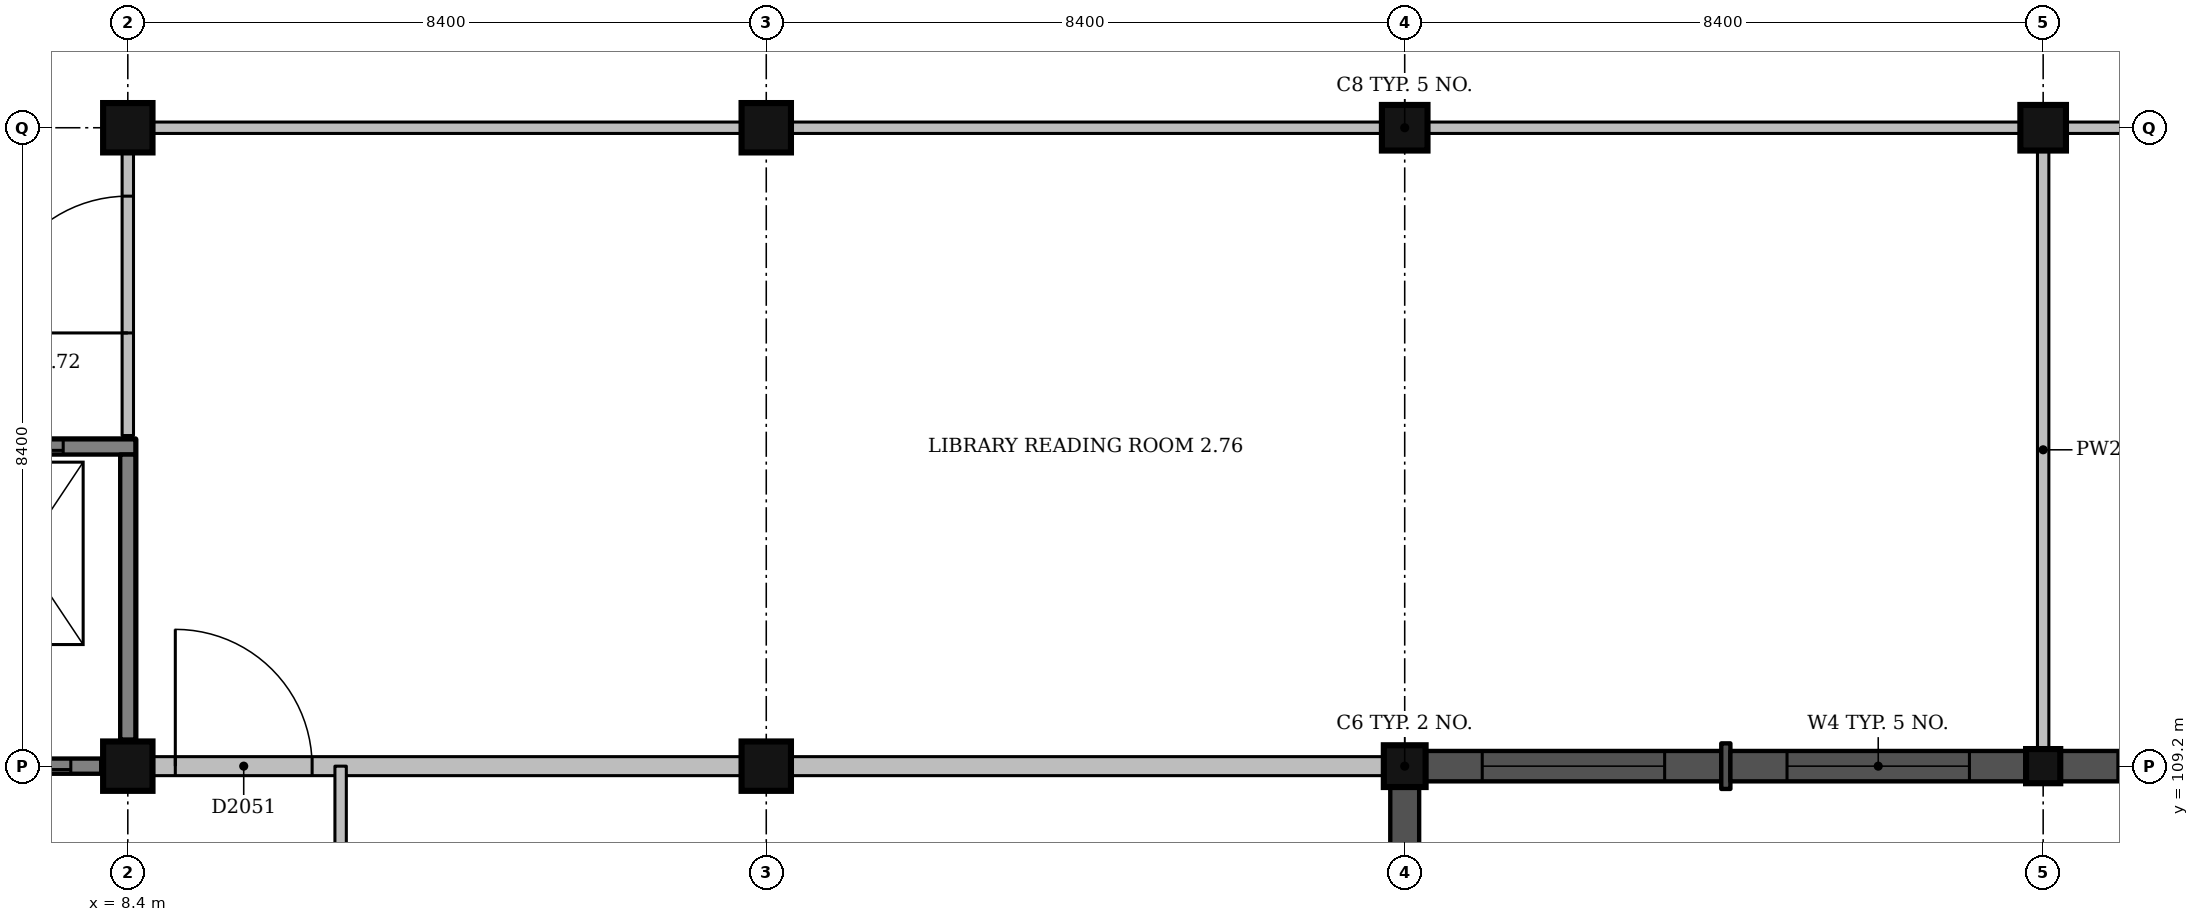
"""IFC4 building model, lengths in metres.
Left out: names, types, materials, properties, quantities, classifications, styles, units other than length and angle.
Written with IfcOpenShell. Run it as: python <this file> out.ifc"""

import sys

from ifc_helpers import new_model, si_unit, direction, frame, frame_2d, origin, origin_2d, place, context, subcontext, project, spatial, rectangle, extrude, element, fill, save


model = new_model("IFC4")
c1 = context("Model", 3, precision=1e-05, world=origin(), true_north=direction((0.0, 1.0)))
c2 = subcontext(c1, "Body", "Model", "MODEL_VIEW")
j1 = project(units=[si_unit("LENGTHUNIT", "METRE"), si_unit("PLANEANGLEUNIT", "RADIAN")], contexts=[c1])
p1 = place(None, origin())
s1 = spatial("IfcSite", under=j1, at=p1, CompositionType="ELEMENT")
p2 = place(p1, origin())
s2 = spatial("IfcBuilding", under=s1, at=p2, CompositionType="ELEMENT")
p3 = place(p2, frame((0.0, 0.0, 9.0)))
s3 = spatial("IfcBuildingStorey", under=s2, at=p3, CompositionType="ELEMENT", Elevation=9.0)
for number, where, z_axis, x_axis in (
    (1, (8.4, 109.2, 0.0), (0.0, 0.0, 1.0), (1.0, 0.0, 0.0)),
    (2, (16.8, 109.2, 0.0), (0.0, 0.0, 1.0), (1.0, 0.0, 0.0)),
):
    element("IfcColumn", number, at=place(p3, frame(where, z_axis=z_axis, x_axis=x_axis)), inside=s3, PredefinedType="COLUMN", context=c2, shape_type="SweptSolid", body=[
        extrude(rectangle(XDim=0.65, YDim=0.65, at=origin_2d()), origin(), (0.0, 0.0, 1.0), 4.5),
    ])
p4 = place(p3, frame((25.2, 109.2, 0.0), z_axis=(0.0, 0.0, 1.0), x_axis=(1.0, 0.0, 0.0)))
e3 = element("IfcColumn", 3, at=p4, inside=s3, PredefinedType="COLUMN", context=c2, shape_type="SweptSolid", body=[
    extrude(rectangle(XDim=0.55, YDim=0.55, at=origin_2d()), origin(), (0.0, 0.0, 1.0), 4.5),
])
for number, where, z_axis, x_axis in (
    (4, (8.4, 117.6, -1.5), (0.0, 0.0, 1.0), (1.0, 0.0, 0.0)),
    (5, (16.8, 117.6, -1.5), (0.0, 0.0, 1.0), (1.0, 0.0, 0.0)),
):
    element("IfcColumn", number, at=place(p3, frame(where, z_axis=z_axis, x_axis=x_axis)), inside=s3, PredefinedType="COLUMN", context=c2, shape_type="SweptSolid", body=[
        extrude(rectangle(XDim=0.65, YDim=0.65, at=origin_2d()), origin(), (0.0, 0.0, 1.0), 6.0),
    ])
p5 = place(p3, frame((25.2, 117.6, -1.5), z_axis=(0.0, 0.0, 1.0), x_axis=(1.0, 0.0, 0.0)))
e6 = element("IfcColumn", 6, at=p5, inside=s3, PredefinedType="COLUMN", context=c2, shape_type="SweptSolid", body=[
    extrude(rectangle(XDim=0.6, YDim=0.6, at=origin_2d()), origin(), (0.0, 0.0, 1.0), 6.0),
])
p6 = place(p3, frame((33.6, 109.2, -0.25), z_axis=(0.0, 0.0, 1.0), x_axis=(1.0, 0.0, 0.0)))
e7 = element("IfcColumn", 7, at=p6, inside=s3, PredefinedType="COLUMN", context=c2, shape_type="SweptSolid", body=[
    extrude(rectangle(XDim=0.45, YDim=0.45, at=origin_2d()), origin(), (0.0, 0.0, 1.0), 4.75),
])
p7 = place(p3, frame((33.6, 117.6, -1.5), z_axis=(0.0, 0.0, 1.0), x_axis=(1.0, 0.0, 0.0)))
e8 = element("IfcColumn", 8, at=p7, inside=s3, PredefinedType="COLUMN", context=c2, shape_type="SweptSolid", body=[
    extrude(rectangle(XDim=0.6, YDim=0.6, at=origin_2d()), origin(), (0.0, 0.0, 1.0), 6.0),
])
p8 = place(p3, frame((5.5, 109.2, 0.0), z_axis=(0.0, 0.0, 1.0), x_axis=(1.0, 0.0, 0.0)))
e9 = element("IfcWall", 9, at=p8, inside=s3, PredefinedType="SHEAR", context=c2, shape_type="SweptSolid", body=[
    extrude(rectangle(XDim=2.55, YDim=0.2, at=frame_2d((1.275, 0.0))), origin(), (0.0, 0.0, 1.0), 4.5),
])
p9 = place(p8, frame((1.05, 0.0, 0.0)))
e10 = element("IfcOpeningElement", 10, at=p9, cuts=e9, PredefinedType="OPENING", context=c2, shape_type="SweptSolid", body=[
    extrude(rectangle(XDim=1.1, YDim=2.1, at=frame_2d((0.55, 1.05))), frame((0.0, 0.11, 0.0), z_axis=(0.0, -1.0, 0.0), x_axis=(1.0, 0.0, 0.0)), (0.0, 0.0, 1.0), 0.22),
])
p10 = place(p3, frame((5.5, 113.4, 0.0), z_axis=(0.0, 0.0, 1.0), x_axis=(1.0, 0.0, 0.0)))
e11 = element("IfcWall", 11, at=p10, inside=s3, PredefinedType="SHEAR", context=c2, shape_type="SweptSolid", body=[
    extrude(rectangle(XDim=3.0, YDim=0.2, at=frame_2d((1.5, 0.0))), origin(), (0.0, 0.0, 1.0), 4.5),
])
p11 = place(p10, frame((0.95, 0.0, 0.0)))
e12 = element("IfcOpeningElement", 12, at=p11, cuts=e11, PredefinedType="OPENING", context=c2, shape_type="SweptSolid", body=[
    extrude(rectangle(XDim=1.1, YDim=2.1, at=frame_2d((0.55, 1.05))), frame((0.0, 0.11, 0.0), z_axis=(0.0, -1.0, 0.0), x_axis=(1.0, 0.0, 0.0)), (0.0, 0.0, 1.0), 0.22),
])
p12 = place(p3, frame((8.4, 109.55, 0.0), z_axis=(0.0, 0.0, 1.0), x_axis=(0.0, 1.0, 0.0)))
e13 = element("IfcWall", 13, at=p12, inside=s3, PredefinedType="SHEAR", context=c2, shape_type="SweptSolid", body=[
    extrude(rectangle(XDim=3.75, YDim=0.2, at=frame_2d((1.875, 0.0))), origin(), (0.0, 0.0, 1.0), 4.5),
])
p13 = place(p3, frame((25.2, 105.275, 0.0), z_axis=(0.0, 0.0, 1.0), x_axis=(0.0, 1.0, 0.0)))
e14 = element("IfcWall", 14, at=p13, inside=s3, PredefinedType="SOLIDWALL", context=c2, shape_type="SweptSolid", body=[
    extrude(rectangle(XDim=3.65, YDim=0.38, at=frame_2d((1.825, 0.0))), origin(), (0.0, 0.0, 1.0), 3.35),
])
p14 = place(p13, frame((1.225, 0.0, 2.4)))
e15 = element("IfcOpeningElement", 15, at=p14, cuts=e14, PredefinedType="OPENING", context=c2, shape_type="SweptSolid", body=[
    extrude(rectangle(XDim=1.2, YDim=0.6, at=frame_2d((0.6, 0.3))), frame((0.0, 0.2, 0.0), z_axis=(0.0, -1.0, 0.0), x_axis=(1.0, 0.0, 0.0)), (0.0, 0.0, 1.0), 0.4),
])
p15 = place(p3, frame((25.475, 109.2, 0.0), z_axis=(0.0, 0.0, 1.0), x_axis=(1.0, 0.0, 0.0)))
e16 = element("IfcWall", 16, at=p15, inside=s3, PredefinedType="SOLIDWALL", context=c2, shape_type="SweptSolid", body=[
    extrude(rectangle(XDim=3.89, YDim=0.4, at=frame_2d((1.945, 0.0))), origin(), (0.0, 0.0, 1.0), 4.2),
])
p16 = place(p15, frame((0.745, 0.0, 0.6)))
e17 = element("IfcOpeningElement", 17, at=p16, cuts=e16, PredefinedType="OPENING", context=c2, shape_type="SweptSolid", body=[
    extrude(rectangle(XDim=2.4, YDim=2.4, at=frame_2d((1.2, 1.2))), frame((0.0, 0.21, 0.0), z_axis=(0.0, -1.0, 0.0), x_axis=(1.0, 0.0, 0.0)), (0.0, 0.0, 1.0), 0.42),
])
p17 = place(p3, frame((29.365, 109.2, 0.0), z_axis=(0.0, 0.0, 1.0), x_axis=(1.0, 0.0, 0.0)))
e18 = element("IfcWall", 18, at=p17, inside=s3, PredefinedType="SOLIDWALL", context=c2, shape_type="SweptSolid", body=[
    extrude(rectangle(XDim=0.12, YDim=0.6, at=frame_2d((0.06, 0.0))), origin(), (0.0, 0.0, 1.0), 4.2),
])
p18 = place(p3, frame((29.485, 109.2, 0.0), z_axis=(0.0, 0.0, 1.0), x_axis=(1.0, 0.0, 0.0)))
e19 = element("IfcWall", 19, at=p18, inside=s3, PredefinedType="SOLIDWALL", context=c2, shape_type="SweptSolid", body=[
    extrude(rectangle(XDim=3.89, YDim=0.4, at=frame_2d((1.945, 0.0))), origin(), (0.0, 0.0, 1.0), 4.2),
])
p19 = place(p18, frame((0.745, 0.0, 0.6)))
e20 = element("IfcOpeningElement", 20, at=p19, cuts=e19, PredefinedType="OPENING", context=c2, shape_type="SweptSolid", body=[
    extrude(rectangle(XDim=2.4, YDim=2.4, at=frame_2d((1.2, 1.2))), frame((0.0, 0.21, 0.0), z_axis=(0.0, -1.0, 0.0), x_axis=(1.0, 0.0, 0.0)), (0.0, 0.0, 1.0), 0.42),
])
p20 = place(p3, frame((33.825, 109.2, 0.0), z_axis=(0.0, 0.0, 1.0), x_axis=(1.0, 0.0, 0.0)))
e21 = element("IfcWall", 21, at=p20, inside=s3, PredefinedType="SOLIDWALL", context=c2, shape_type="SweptSolid", body=[
    extrude(rectangle(XDim=3.915, YDim=0.4, at=frame_2d((1.958, 0.0))), origin(), (0.0, 0.0, 1.0), 3.35),
])
p21 = place(p20, frame((0.758, 0.0, 0.6)))
e22 = element("IfcOpeningElement", 22, at=p21, cuts=e21, PredefinedType="OPENING", context=c2, shape_type="SweptSolid", body=[
    extrude(rectangle(XDim=2.4, YDim=2.4, at=frame_2d((1.2, 1.2))), frame((0.0, 0.21, 0.0), z_axis=(0.0, -1.0, 0.0), x_axis=(1.0, 0.0, 0.0)), (0.0, 0.0, 1.0), 0.42),
])
p22 = place(p3, frame((8.725, 109.2, 0.0), z_axis=(0.0, 0.0, 1.0), x_axis=(1.0, 0.0, 0.0)))
e23 = element("IfcWall", 23, at=p22, inside=s3, PredefinedType="SOLIDWALL", context=c2, shape_type="SweptSolid", body=[
    extrude(rectangle(XDim=7.75, YDim=0.25, at=frame_2d((3.875, 0.0))), origin(), (0.0, 0.0, 1.0), 4.15),
])
p23 = place(p22, frame((0.3, 0.0, 0.0)))
e24 = element("IfcOpeningElement", 24, at=p23, cuts=e23, PredefinedType="OPENING", context=c2, shape_type="SweptSolid", body=[
    extrude(rectangle(XDim=1.8, YDim=2.1, at=frame_2d((0.9, 1.05))), frame((0.0, 0.135, 0.0), z_axis=(0.0, -1.0, 0.0), x_axis=(1.0, 0.0, 0.0)), (0.0, 0.0, 1.0), 0.27),
])
p24 = place(p3, frame((17.125, 109.2, 0.0), z_axis=(0.0, 0.0, 1.0), x_axis=(1.0, 0.0, 0.0)))
e25 = element("IfcWall", 25, at=p24, inside=s3, PredefinedType="SOLIDWALL", context=c2, shape_type="SweptSolid", body=[
    extrude(rectangle(XDim=7.8, YDim=0.25, at=frame_2d((3.9, 0.0))), origin(), (0.0, 0.0, 1.0), 3.35),
])
p25 = place(p3, frame((8.725, 117.6, 0.0), z_axis=(0.0, 0.0, 1.0), x_axis=(1.0, 0.0, 0.0)))
e26 = element("IfcWall", 26, at=p25, inside=s3, PredefinedType="PARTITIONING", context=c2, shape_type="SweptSolid", body=[
    extrude(rectangle(XDim=7.75, YDim=0.15, at=frame_2d((3.875, 0.0))), origin(), (0.0, 0.0, 1.0), 3.4),
])
p26 = place(p3, frame((17.125, 117.6, 0.0), z_axis=(0.0, 0.0, 1.0), x_axis=(1.0, 0.0, 0.0)))
e27 = element("IfcWall", 27, at=p26, inside=s3, PredefinedType="PARTITIONING", context=c2, shape_type="SweptSolid", body=[
    extrude(rectangle(XDim=7.775, YDim=0.15, at=frame_2d((3.887, 0.0))), origin(), (0.0, 0.0, 1.0), 3.4),
])
p27 = place(p3, frame((25.5, 117.6, 0.0), z_axis=(0.0, 0.0, 1.0), x_axis=(1.0, 0.0, 0.0)))
e28 = element("IfcWall", 28, at=p27, inside=s3, PredefinedType="PARTITIONING", context=c2, shape_type="SweptSolid", body=[
    extrude(rectangle(XDim=7.8, YDim=0.15, at=frame_2d((3.9, 0.0))), origin(), (0.0, 0.0, 1.0), 3.4),
])
p28 = place(p3, frame((33.9, 117.6, 0.0), z_axis=(0.0, 0.0, 1.0), x_axis=(1.0, 0.0, 0.0)))
e29 = element("IfcWall", 29, at=p28, inside=s3, PredefinedType="PARTITIONING", context=c2, shape_type="SweptSolid", body=[
    extrude(rectangle(XDim=7.8, YDim=0.15, at=frame_2d((3.9, 0.0))), origin(), (0.0, 0.0, 1.0), 3.4),
])
p29 = place(p28, frame((3.45, 0.0, 0.0)))
e30 = element("IfcOpeningElement", 30, at=p29, cuts=e29, PredefinedType="OPENING", context=c2, shape_type="SweptSolid", body=[
    extrude(rectangle(XDim=0.9, YDim=2.1, at=frame_2d((0.45, 1.05))), frame((0.0, 0.085, 0.0), z_axis=(0.0, -1.0, 0.0), x_axis=(1.0, 0.0, 0.0)), (0.0, 0.0, 1.0), 0.17),
])
p30 = place(p3, frame((8.4, 113.55, 0.0), z_axis=(0.0, 0.0, 1.0), x_axis=(0.0, 1.0, 0.0)))
e31 = element("IfcWall", 31, at=p30, inside=s3, PredefinedType="PARTITIONING", context=c2, shape_type="SweptSolid", body=[
    extrude(rectangle(XDim=3.725, YDim=0.15, at=frame_2d((1.862, 0.0))), origin(), (0.0, 0.0, 1.0), 3.4),
])
p31 = place(p30, frame((1.35, 0.0, 0.0)))
e32 = element("IfcOpeningElement", 32, at=p31, cuts=e31, PredefinedType="OPENING", context=c2, shape_type="SweptSolid", body=[
    extrude(rectangle(XDim=1.8, YDim=2.1, at=frame_2d((0.9, 1.05))), frame((0.0, 0.085, 0.0), z_axis=(0.0, -1.0, 0.0), x_axis=(1.0, 0.0, 0.0)), (0.0, 0.0, 1.0), 0.17),
])
p32 = place(p3, frame((11.2, 96.6, 0.0), z_axis=(0.0, 0.0, 1.0), x_axis=(0.0, 1.0, 0.0)))
e33 = element("IfcWall", 33, at=p32, inside=s3, PredefinedType="PARTITIONING", context=c2, shape_type="SweptSolid", body=[
    extrude(rectangle(XDim=12.6, YDim=0.15, at=frame_2d((6.3, 0.0))), origin(), (0.0, 0.0, 1.0), 3.4),
])
p33 = place(p32, frame((1.7, 0.0, 0.0)))
e34 = element("IfcOpeningElement", 34, at=p33, cuts=e33, PredefinedType="OPENING", context=c2, shape_type="SweptSolid", body=[
    extrude(rectangle(XDim=0.9, YDim=2.1, at=frame_2d((0.45, 1.05))), frame((0.0, 0.085, 0.0), z_axis=(0.0, -1.0, 0.0), x_axis=(1.0, 0.0, 0.0)), (0.0, 0.0, 1.0), 0.17),
])
p34 = place(p32, frame((8.0, 0.0, 0.0)))
e35 = element("IfcOpeningElement", 35, at=p34, cuts=e33, PredefinedType="OPENING", context=c2, shape_type="SweptSolid", body=[
    extrude(rectangle(XDim=0.9, YDim=2.1, at=frame_2d((0.45, 1.05))), frame((0.0, 0.085, 0.0), z_axis=(0.0, -1.0, 0.0), x_axis=(1.0, 0.0, 0.0)), (0.0, 0.0, 1.0), 0.17),
])
p35 = place(p3, frame((33.6, 109.425, 0.0), z_axis=(0.0, 0.0, 1.0), x_axis=(0.0, 1.0, 0.0)))
e36 = element("IfcWall", 36, at=p35, inside=s3, PredefinedType="PARTITIONING", context=c2, shape_type="SweptSolid", body=[
    extrude(rectangle(XDim=7.875, YDim=0.15, at=frame_2d((3.938, 0.0))), origin(), (0.0, 0.0, 1.0), 3.4),
])
p36 = place(p16, origin())
e37 = element("IfcWindow", 37, at=p36, inside=s3, PartitioningType="SINGLE_PANEL", PredefinedType="WINDOW", context=c2, shape_type="SweptSolid", body=[
    extrude(rectangle(XDim=2.4, YDim=2.4, at=frame_2d((1.2, 1.2))), frame((0.0, 0.16, 0.0), z_axis=(0.0, -1.0, 0.0), x_axis=(1.0, 0.0, 0.0)), (0.0, 0.0, 1.0), 0.06),
])
fill(e17, e37)
p37 = place(p19, origin())
e38 = element("IfcWindow", 38, at=p37, inside=s3, PartitioningType="SINGLE_PANEL", PredefinedType="WINDOW", context=c2, shape_type="SweptSolid", body=[
    extrude(rectangle(XDim=2.4, YDim=2.4, at=frame_2d((1.2, 1.2))), frame((0.0, 0.16, 0.0), z_axis=(0.0, -1.0, 0.0), x_axis=(1.0, 0.0, 0.0)), (0.0, 0.0, 1.0), 0.06),
])
fill(e20, e38)
p38 = place(p21, origin())
e39 = element("IfcWindow", 39, at=p38, inside=s3, PartitioningType="SINGLE_PANEL", PredefinedType="WINDOW", context=c2, shape_type="SweptSolid", body=[
    extrude(rectangle(XDim=2.4, YDim=2.4, at=frame_2d((1.2, 1.2))), frame((0.0, 0.16, 0.0), z_axis=(0.0, -1.0, 0.0), x_axis=(1.0, 0.0, 0.0)), (0.0, 0.0, 1.0), 0.06),
])
fill(e22, e39)
p39 = place(p23, origin())
e40 = element("IfcDoor", 40, at=p39, inside=s3, OperationType="DOUBLE_DOOR_SINGLE_SWING", PredefinedType="DOOR", context=c2, shape_type="SweptSolid", body=[
    extrude(rectangle(XDim=1.8, YDim=2.1, at=frame_2d((0.9, 1.05))), frame((0.0, 0.025, 0.0), z_axis=(0.0, -1.0, 0.0), x_axis=(1.0, 0.0, 0.0)), (0.0, 0.0, 1.0), 0.05),
])
fill(e24, e40)
p40 = place(p31, origin())
e41 = element("IfcDoor", 41, at=p40, inside=s3, OperationType="DOUBLE_DOOR_SINGLE_SWING", PredefinedType="DOOR", context=c2, shape_type="SweptSolid", body=[
    extrude(rectangle(XDim=1.8, YDim=2.1, at=frame_2d((0.9, 1.05))), frame((0.0, 0.025, 0.0), z_axis=(0.0, -1.0, 0.0), x_axis=(1.0, 0.0, 0.0)), (0.0, 0.0, 1.0), 0.05),
])
fill(e32, e41)
p41 = place(p9, origin())
e42 = element("IfcDoor", 42, at=p41, inside=s3, OperationType="SLIDING_TO_RIGHT", PredefinedType="DOOR", context=c2, shape_type="SweptSolid", body=[
    extrude(rectangle(XDim=1.1, YDim=2.1, at=frame_2d((0.55, 1.05))), frame((0.0, 0.025, 0.0), z_axis=(0.0, -1.0, 0.0), x_axis=(1.0, 0.0, 0.0)), (0.0, 0.0, 1.0), 0.05),
])
fill(e10, e42)
p42 = place(p11, origin())
e43 = element("IfcDoor", 43, at=p42, inside=s3, OperationType="SLIDING_TO_LEFT", PredefinedType="DOOR", context=c2, shape_type="SweptSolid", body=[
    extrude(rectangle(XDim=1.1, YDim=2.1, at=frame_2d((0.55, 1.05))), frame((0.0, 0.025, 0.0), z_axis=(0.0, -1.0, 0.0), x_axis=(1.0, 0.0, 0.0)), (0.0, 0.0, 1.0), 0.05),
])
fill(e12, e43)
save(model, sys.argv[1])
